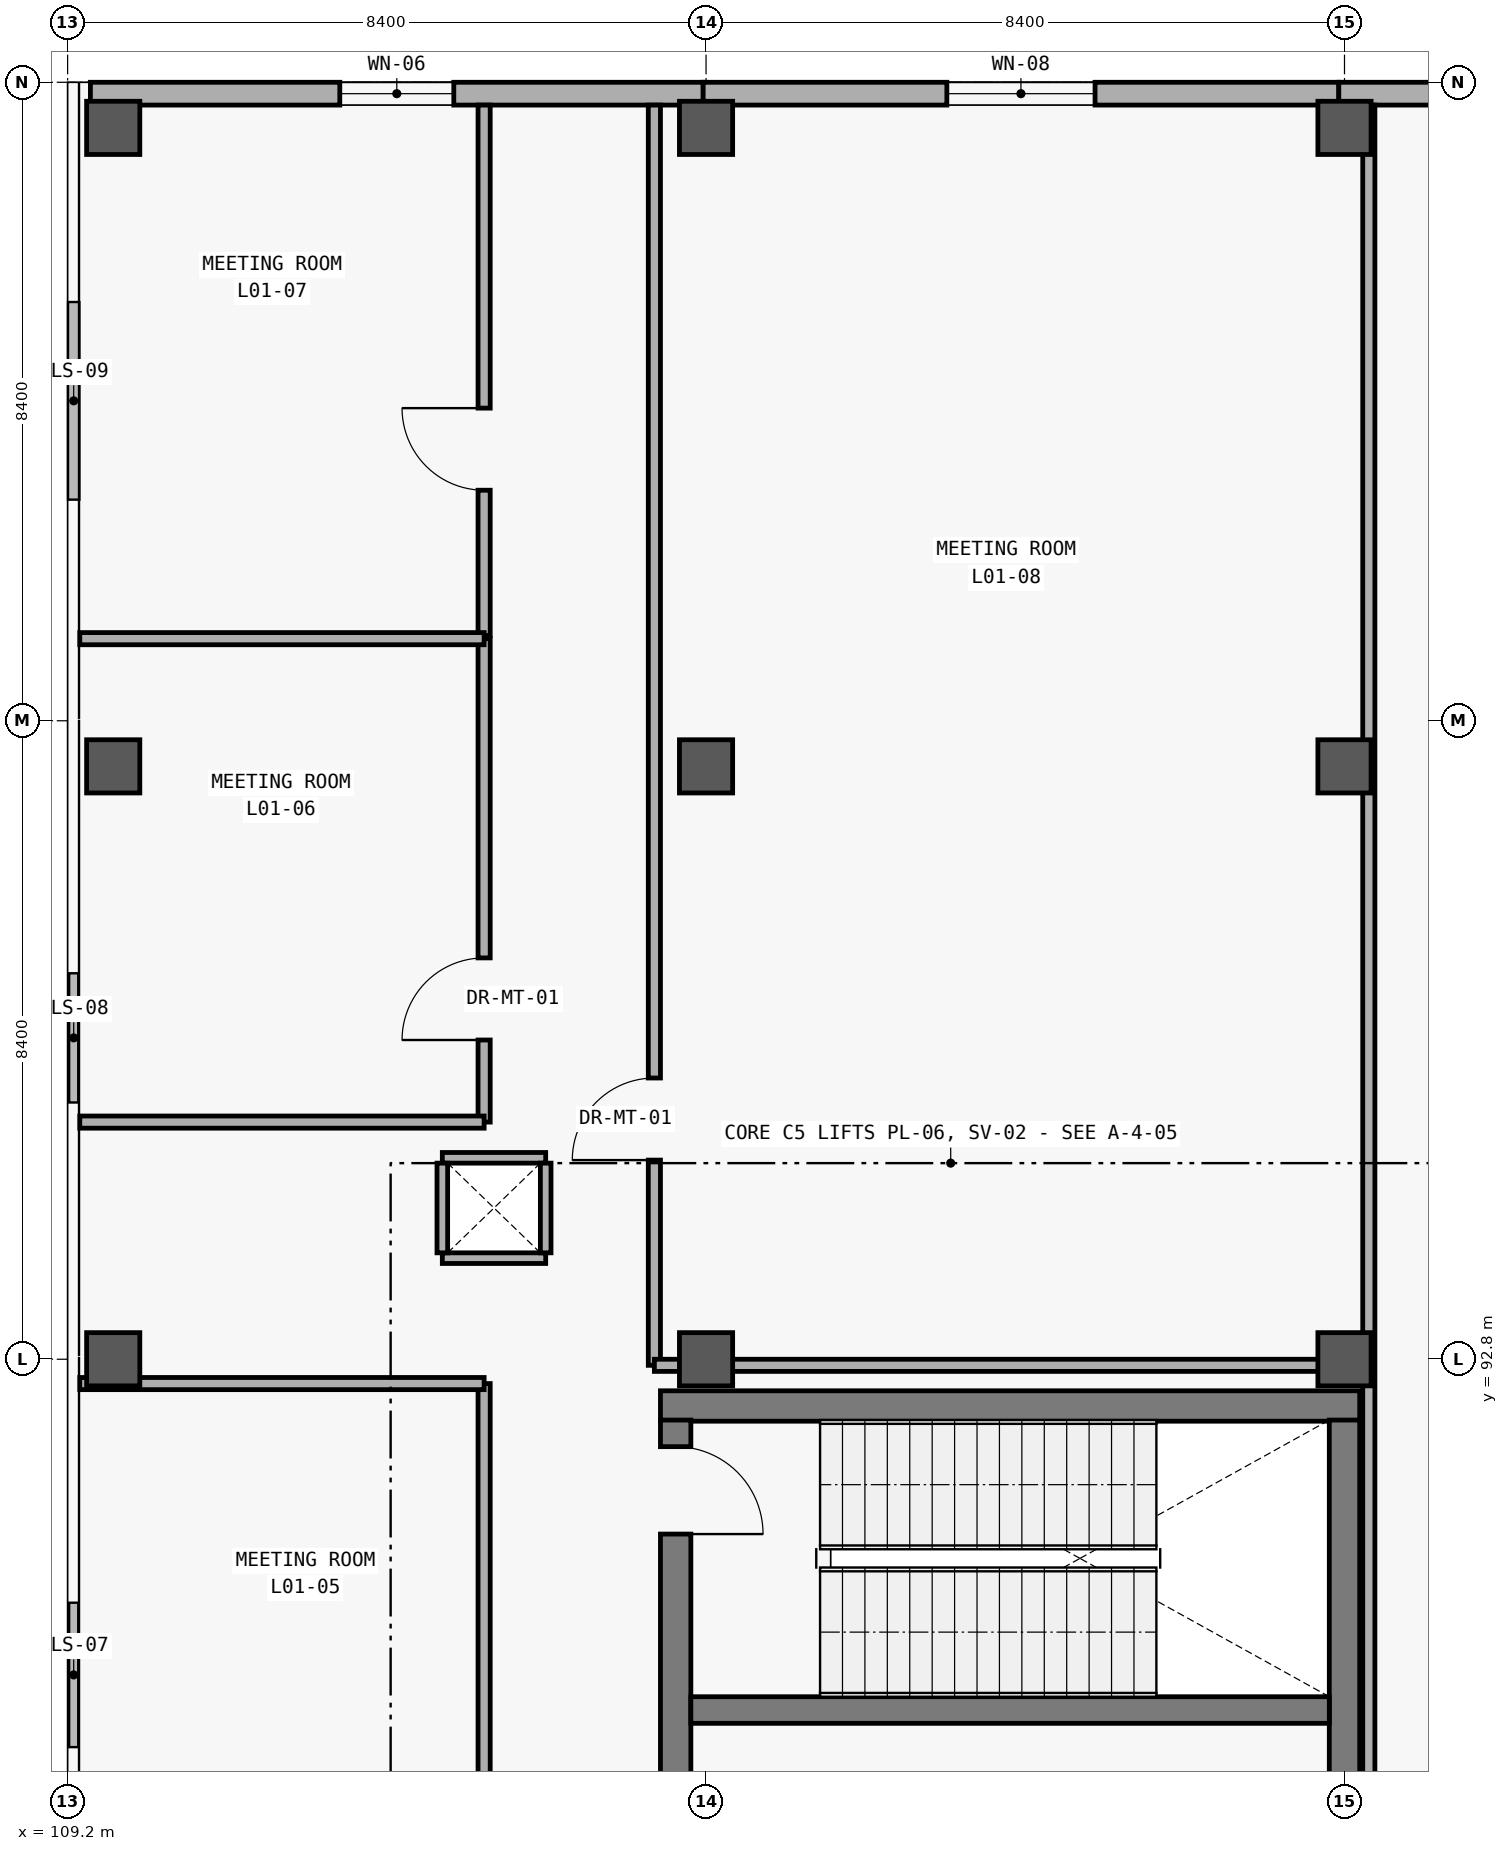
"""IFC4 building model, lengths in metres.
Left out: names, types, materials, properties, quantities, classifications, styles, units other than length and angle.
Written with IfcOpenShell. Run it as: python <this file> out.ifc"""

import sys

from ifc_helpers import new_model, si_unit, direction, frame, frame_2d, origin, origin_2d, place, context, subcontext, project, spatial, rectangle, extrude, element, fill, save


model = new_model("IFC4")
c1 = context("Model", 3, precision=1e-05, world=origin(), true_north=direction((0.0, 1.0)))
c2 = subcontext(c1, "Body", "Model", "MODEL_VIEW")
j1 = project(units=[si_unit("LENGTHUNIT", "METRE"), si_unit("PLANEANGLEUNIT", "RADIAN")], contexts=[c1])
p1 = place(None, origin())
s1 = spatial("IfcSite", under=j1, at=p1, CompositionType="ELEMENT")
p2 = place(p1, origin())
s2 = spatial("IfcBuilding", under=s1, at=p2, CompositionType="ELEMENT")
p3 = place(p2, frame((0.0, 0.0, 5.4)))
s3 = spatial("IfcBuildingStorey", under=s2, at=p3, CompositionType="ELEMENT", Elevation=5.4)
for number, where, z_axis, x_axis in (
    (1, (109.8, 92.8, 0.0), (0.0, 0.0, 1.0), (1.0, 0.0, 0.0)),
    (2, (109.8, 100.6, 0.0), (0.0, 0.0, 1.0), (1.0, 0.0, 0.0)),
    (3, (109.8, 109.0, 0.0), (0.0, 0.0, 1.0), (1.0, 0.0, 0.0)),
    (4, (117.6, 92.8, 0.0), (0.0, 0.0, 1.0), (1.0, 0.0, 0.0)),
    (5, (117.6, 100.6, 0.0), (0.0, 0.0, 1.0), (1.0, 0.0, 0.0)),
    (6, (117.6, 109.0, 0.0), (0.0, 0.0, 1.0), (1.0, 0.0, 0.0)),
    (7, (126.0, 92.8, 0.0), (0.0, 0.0, 1.0), (1.0, 0.0, 0.0)),
    (8, (126.0, 100.6, 0.0), (0.0, 0.0, 1.0), (1.0, 0.0, 0.0)),
    (9, (126.0, 109.0, 0.0), (0.0, 0.0, 1.0), (1.0, 0.0, 0.0)),
):
    element("IfcColumn", number, at=place(p3, frame(where, z_axis=z_axis, x_axis=x_axis)), inside=s3, PredefinedType="COLUMN", context=c2, shape_type="SweptSolid", body=[
        extrude(rectangle(XDim=0.7, YDim=0.7, at=origin_2d()), origin(), (0.0, 0.0, 1.0), 5.4),
    ])
p4 = place(p3, frame((109.5, 109.45, 0.0), z_axis=(0.0, 0.0, 1.0), x_axis=(1.0, 0.0, 0.0)))
e10 = element("IfcWall", 10, at=p4, inside=s3, PredefinedType="SOLIDWALL", context=c2, shape_type="SweptSolid", body=[
    extrude(rectangle(XDim=8.062, YDim=0.3, at=frame_2d((4.031, 0.0))), origin(), (0.0, 0.0, 1.0), 5.1),
])
p5 = place(p4, frame((3.281, 0.0, 0.9)))
e11 = element("IfcOpeningElement", 11, at=p5, cuts=e10, PredefinedType="OPENING", context=c2, shape_type="SweptSolid", body=[
    extrude(rectangle(XDim=1.5, YDim=1.75, at=frame_2d((0.75, 0.875))), frame((0.0, 0.16, 0.0), z_axis=(0.0, -1.0, 0.0), x_axis=(1.0, 0.0, 0.0)), (0.0, 0.0, 1.0), 0.32),
])
p6 = place(p3, frame((117.562, 109.45, 0.0), z_axis=(0.0, 0.0, 1.0), x_axis=(1.0, 0.0, 0.0)))
e12 = element("IfcWall", 12, at=p6, inside=s3, PredefinedType="SOLIDWALL", context=c2, shape_type="SweptSolid", body=[
    extrude(rectangle(XDim=8.363, YDim=0.3, at=frame_2d((4.182, 0.0))), origin(), (0.0, 0.0, 1.0), 5.1),
])
p7 = place(p6, frame((3.206, 0.0, 0.9)))
e13 = element("IfcOpeningElement", 13, at=p7, cuts=e12, PredefinedType="OPENING", context=c2, shape_type="SweptSolid", body=[
    extrude(rectangle(XDim=1.95, YDim=1.75, at=frame_2d((0.975, 0.875))), frame((0.0, 0.16, 0.0), z_axis=(0.0, -1.0, 0.0), x_axis=(1.0, 0.0, 0.0)), (0.0, 0.0, 1.0), 0.32),
])
p8 = place(p3, frame((125.925, 109.45, 0.0), z_axis=(0.0, 0.0, 1.0), x_axis=(1.0, 0.0, 0.0)))
e14 = element("IfcWall", 14, at=p8, inside=s3, PredefinedType="SOLIDWALL", context=c2, shape_type="SweptSolid", body=[
    extrude(rectangle(XDim=8.362, YDim=0.3, at=frame_2d((4.181, 0.0))), origin(), (0.0, 0.0, 1.0), 5.1),
])
p9 = place(p8, frame((2.906, 0.0, 0.9)))
e15 = element("IfcOpeningElement", 15, at=p9, cuts=e14, PredefinedType="OPENING", context=c2, shape_type="SweptSolid", body=[
    extrude(rectangle(XDim=2.55, YDim=1.8, at=frame_2d((1.275, 0.9))), frame((0.0, 0.16, 0.0), z_axis=(0.0, -1.0, 0.0), x_axis=(1.0, 0.0, 0.0)), (0.0, 0.0, 1.0), 0.32),
])
p10 = place(p3, frame((126.2, 92.185, 0.0), z_axis=(0.0, 0.0, 1.0), x_axis=(-1.0, 0.0, 0.0)))
e16 = element("IfcWall", 16, at=p10, inside=s3, PredefinedType="SHEAR", context=c2, shape_type="SweptSolid", body=[
    extrude(rectangle(XDim=9.2, YDim=0.4, at=frame_2d((4.6, 0.0))), origin(), (0.0, 0.0, 1.0), 5.08),
])
p11 = place(p3, frame((117.2, 92.0, 0.0), z_axis=(0.0, 0.0, 1.0), x_axis=(0.0, -1.0, 0.0)))
e17 = element("IfcWall", 17, at=p11, inside=s3, PredefinedType="SHEAR", context=c2, shape_type="SweptSolid", body=[
    extrude(rectangle(XDim=7.2, YDim=0.4, at=frame_2d((3.6, 0.0))), origin(), (0.0, 0.0, 1.0), 5.08),
])
p12 = place(p11, frame((0.35, 0.0, 0.0)))
e18 = element("IfcOpeningElement", 18, at=p12, cuts=e17, PredefinedType="OPENING", context=c2, shape_type="SweptSolid", body=[
    extrude(rectangle(XDim=1.15, YDim=2.2, at=frame_2d((0.575, 1.1))), frame((0.0, 0.21, 0.0), z_axis=(0.0, -1.0, 0.0), x_axis=(1.0, 0.0, 0.0)), (0.0, 0.0, 1.0), 0.42),
])
p13 = place(p3, frame((126.0, 84.8, 0.0), z_axis=(0.0, 0.0, 1.0), x_axis=(0.0, 1.0, 0.0)))
e19 = element("IfcWall", 19, at=p13, inside=s3, PredefinedType="SHEAR", context=c2, shape_type="SweptSolid", body=[
    extrude(rectangle(XDim=7.2, YDim=0.4, at=frame_2d((3.6, 0.0))), origin(), (0.0, 0.0, 1.0), 5.08),
])
p14 = place(p3, frame((117.4, 88.185, 0.0), z_axis=(0.0, 0.0, 1.0), x_axis=(1.0, 0.0, 0.0)))
e20 = element("IfcWall", 20, at=p14, inside=s3, PredefinedType="SHEAR", context=c2, shape_type="SweptSolid", body=[
    extrude(rectangle(XDim=8.4, YDim=0.35, at=frame_2d((4.2, 0.0))), origin(), (0.0, 0.0, 1.0), 5.08),
])
p15 = place(p3, frame((114.68, 84.32, 0.0), z_axis=(0.0, 0.0, 1.0), x_axis=(0.0, 1.0, 0.0)))
e21 = element("IfcWall", 21, at=p15, inside=s3, PredefinedType="PARTITIONING", context=c2, shape_type="SweptSolid", body=[
    extrude(rectangle(XDim=8.16, YDim=0.16, at=frame_2d((4.08, 0.0))), origin(), (0.0, 0.0, 1.0), 4.18),
])
p16 = place(p15, frame((1.68, 0.0, 0.0)))
e22 = element("IfcOpeningElement", 22, at=p16, cuts=e21, PredefinedType="OPENING", context=c2, shape_type="SweptSolid", body=[
    extrude(rectangle(XDim=1.08, YDim=2.25, at=frame_2d((0.54, 1.125))), frame((0.0, 0.09, 0.0), z_axis=(0.0, -1.0, 0.0), x_axis=(1.0, 0.0, 0.0)), (0.0, 0.0, 1.0), 0.18),
])
p17 = place(p3, frame((114.68, 95.92, 0.0), z_axis=(0.0, 0.0, 1.0), x_axis=(0.0, 1.0, 0.0)))
e23 = element("IfcWall", 23, at=p17, inside=s3, PredefinedType="PARTITIONING", context=c2, shape_type="SweptSolid", body=[
    extrude(rectangle(XDim=6.36, YDim=0.16, at=frame_2d((3.18, 0.0))), origin(), (0.0, 0.0, 1.0), 4.18),
])
p18 = place(p17, frame((1.08, 0.0, 0.0)))
e24 = element("IfcOpeningElement", 24, at=p18, cuts=e23, PredefinedType="OPENING", context=c2, shape_type="SweptSolid", body=[
    extrude(rectangle(XDim=1.08, YDim=2.25, at=frame_2d((0.54, 1.125))), frame((0.0, 0.09, 0.0), z_axis=(0.0, -1.0, 0.0), x_axis=(1.0, 0.0, 0.0)), (0.0, 0.0, 1.0), 0.18),
])
p19 = place(p3, frame((114.68, 102.32, 0.0), z_axis=(0.0, 0.0, 1.0), x_axis=(0.0, 1.0, 0.0)))
e25 = element("IfcWall", 25, at=p19, inside=s3, PredefinedType="PARTITIONING", context=c2, shape_type="SweptSolid", body=[
    extrude(rectangle(XDim=6.98, YDim=0.16, at=frame_2d((3.49, 0.0))), origin(), (0.0, 0.0, 1.0), 4.18),
])
p20 = place(p19, frame((1.913, 0.0, 0.0)))
e26 = element("IfcOpeningElement", 26, at=p20, cuts=e25, PredefinedType="OPENING", context=c2, shape_type="SweptSolid", body=[
    extrude(rectangle(XDim=1.08, YDim=2.25, at=frame_2d((0.54, 1.125))), frame((0.0, 0.09, 0.0), z_axis=(0.0, -1.0, 0.0), x_axis=(1.0, 0.0, 0.0)), (0.0, 0.0, 1.0), 0.18),
])
p21 = place(p3, frame((116.92, 92.72, 0.0), z_axis=(0.0, 0.0, 1.0), x_axis=(0.0, 1.0, 0.0)))
e27 = element("IfcWall", 27, at=p21, inside=s3, PredefinedType="PARTITIONING", context=c2, shape_type="SweptSolid", body=[
    extrude(rectangle(XDim=16.58, YDim=0.16, at=frame_2d((8.29, 0.0))), origin(), (0.0, 0.0, 1.0), 4.18),
])
p22 = place(p21, frame((2.7, 0.0, 0.0)))
e28 = element("IfcOpeningElement", 28, at=p22, cuts=e27, PredefinedType="OPENING", context=c2, shape_type="SweptSolid", body=[
    extrude(rectangle(XDim=1.08, YDim=2.25, at=frame_2d((0.54, 1.125))), frame((0.0, 0.09, 0.0), z_axis=(0.0, -1.0, 0.0), x_axis=(1.0, 0.0, 0.0)), (0.0, 0.0, 1.0), 0.18),
])
p23 = place(p3, frame((126.32, 59.92, 0.0), z_axis=(0.0, 0.0, 1.0), x_axis=(0.0, 1.0, 0.0)))
e29 = element("IfcWall", 29, at=p23, inside=s3, PredefinedType="PARTITIONING", context=c2, shape_type="SweptSolid", body=[
    extrude(rectangle(XDim=49.38, YDim=0.16, at=frame_2d((24.69, 0.0))), origin(), (0.0, 0.0, 1.0), 4.18),
])
p24 = place(p23, frame((2.935, 0.0, 0.0)))
e30 = element("IfcOpeningElement", 30, at=p24, cuts=e29, PredefinedType="OPENING", context=c2, shape_type="SweptSolid", body=[
    extrude(rectangle(XDim=1.08, YDim=2.25, at=frame_2d((0.54, 1.125))), frame((0.0, 0.09, 0.0), z_axis=(0.0, -1.0, 0.0), x_axis=(1.0, 0.0, 0.0)), (0.0, 0.0, 1.0), 0.18),
])
for number, where, z_axis, x_axis in (
    (31, (109.36, 92.48, 0.0), (0.0, 0.0, 1.0), (1.0, 0.0, 0.0)),
    (32, (109.36, 95.92, 0.0), (0.0, 0.0, 1.0), (1.0, 0.0, 0.0)),
    (33, (109.36, 102.28, 0.0), (0.0, 0.0, 1.0), (1.0, 0.0, 0.0)),
):
    element("IfcWall", number, at=place(p3, frame(where, z_axis=z_axis, x_axis=x_axis)), inside=s3, PredefinedType="PARTITIONING", context=c2, shape_type="SweptSolid", body=[
        extrude(rectangle(XDim=5.32, YDim=0.16, at=frame_2d((2.66, 0.0))), origin(), (0.0, 0.0, 1.0), 4.18),
    ])
p25 = place(p3, frame((116.92, 92.72, 0.0), z_axis=(0.0, 0.0, 1.0), x_axis=(1.0, 0.0, 0.0)))
e34 = element("IfcWall", 34, at=p25, inside=s3, PredefinedType="PARTITIONING", context=c2, shape_type="SweptSolid", body=[
    extrude(rectangle(XDim=9.26, YDim=0.16, at=frame_2d((4.63, 0.0))), origin(), (0.0, 0.0, 1.0), 4.18),
])
for number, where, z_axis, x_axis in (
    (35, (114.13, 94.13, 0.0), (0.0, 0.0, 1.0), (1.0, 0.0, 0.0)),
    (36, (115.49, 95.45, 0.0), (0.0, 0.0, 1.0), (-1.0, 0.0, 0.0)),
):
    element("IfcWall", number, at=place(p3, frame(where, z_axis=z_axis, x_axis=x_axis)), inside=s3, PredefinedType="PARTITIONING", context=c2, shape_type="SweptSolid", body=[
        extrude(rectangle(XDim=1.36, YDim=0.14, at=frame_2d((0.68, 0.0))), origin(), (0.0, 0.0, 1.0), 4.2),
    ])
for number, where, z_axis, x_axis in (
    (37, (114.13, 95.38, 0.0), (0.0, 0.0, 1.0), (0.0, -1.0, 0.0)),
    (38, (115.49, 94.2, 0.0), (0.0, 0.0, 1.0), (0.0, 1.0, 0.0)),
):
    element("IfcWall", number, at=place(p3, frame(where, z_axis=z_axis, x_axis=x_axis)), inside=s3, PredefinedType="PARTITIONING", context=c2, shape_type="SweptSolid", body=[
        extrude(rectangle(XDim=1.18, YDim=0.14, at=frame_2d((0.59, 0.0))), origin(), (0.0, 0.0, 1.0), 4.2),
    ])
p26 = place(p5, origin())
e39 = element("IfcWindow", 39, at=p26, inside=s3, PartitioningType="SINGLE_PANEL", PredefinedType="WINDOW", context=c2, shape_type="SweptSolid", body=[
    extrude(rectangle(XDim=1.5, YDim=1.75, at=frame_2d((0.75, 0.875))), frame((0.0, 0.03, 0.0), z_axis=(0.0, -1.0, 0.0), x_axis=(1.0, 0.0, 0.0)), (0.0, 0.0, 1.0), 0.06),
])
fill(e11, e39)
p27 = place(p7, origin())
e40 = element("IfcWindow", 40, at=p27, inside=s3, PartitioningType="SINGLE_PANEL", PredefinedType="WINDOW", context=c2, shape_type="SweptSolid", body=[
    extrude(rectangle(XDim=1.95, YDim=1.75, at=frame_2d((0.975, 0.875))), frame((0.0, 0.03, 0.0), z_axis=(0.0, -1.0, 0.0), x_axis=(1.0, 0.0, 0.0)), (0.0, 0.0, 1.0), 0.06),
])
fill(e13, e40)
p28 = place(p12, origin())
e41 = element("IfcDoor", 41, at=p28, inside=s3, OperationType="SINGLE_SWING_RIGHT", PredefinedType="DOOR", context=c2, shape_type="SweptSolid", body=[
    extrude(rectangle(XDim=1.15, YDim=2.2, at=frame_2d((0.575, 1.1))), frame((0.0, 0.025, 0.0), z_axis=(0.0, -1.0, 0.0), x_axis=(1.0, 0.0, 0.0)), (0.0, 0.0, 1.0), 0.05),
])
fill(e18, e41)
p29 = place(p18, origin())
e42 = element("IfcDoor", 42, at=p29, inside=s3, OperationType="SINGLE_SWING_LEFT", PredefinedType="DOOR", context=c2, shape_type="SweptSolid", body=[
    extrude(rectangle(XDim=1.08, YDim=2.25, at=frame_2d((0.54, 1.125))), frame((0.0, 0.025, 0.0), z_axis=(0.0, -1.0, 0.0), x_axis=(1.0, 0.0, 0.0)), (0.0, 0.0, 1.0), 0.05),
])
fill(e24, e42)
p30 = place(p20, origin())
e43 = element("IfcDoor", 43, at=p30, inside=s3, OperationType="SINGLE_SWING_RIGHT", PredefinedType="DOOR", context=c2, shape_type="SweptSolid", body=[
    extrude(rectangle(XDim=1.08, YDim=2.25, at=frame_2d((0.54, 1.125))), frame((0.0, 0.025, 0.0), z_axis=(0.0, -1.0, 0.0), x_axis=(1.0, 0.0, 0.0)), (0.0, 0.0, 1.0), 0.05),
])
fill(e26, e43)
p31 = place(p22, origin())
e44 = element("IfcDoor", 44, at=p31, inside=s3, OperationType="SINGLE_SWING_LEFT", PredefinedType="DOOR", context=c2, shape_type="SweptSolid", body=[
    extrude(rectangle(XDim=1.08, YDim=2.25, at=frame_2d((0.54, 1.125))), frame((0.0, 0.025, 0.0), z_axis=(0.0, -1.0, 0.0), x_axis=(1.0, 0.0, 0.0)), (0.0, 0.0, 1.0), 0.05),
])
fill(e28, e44)
save(model, sys.argv[1])
